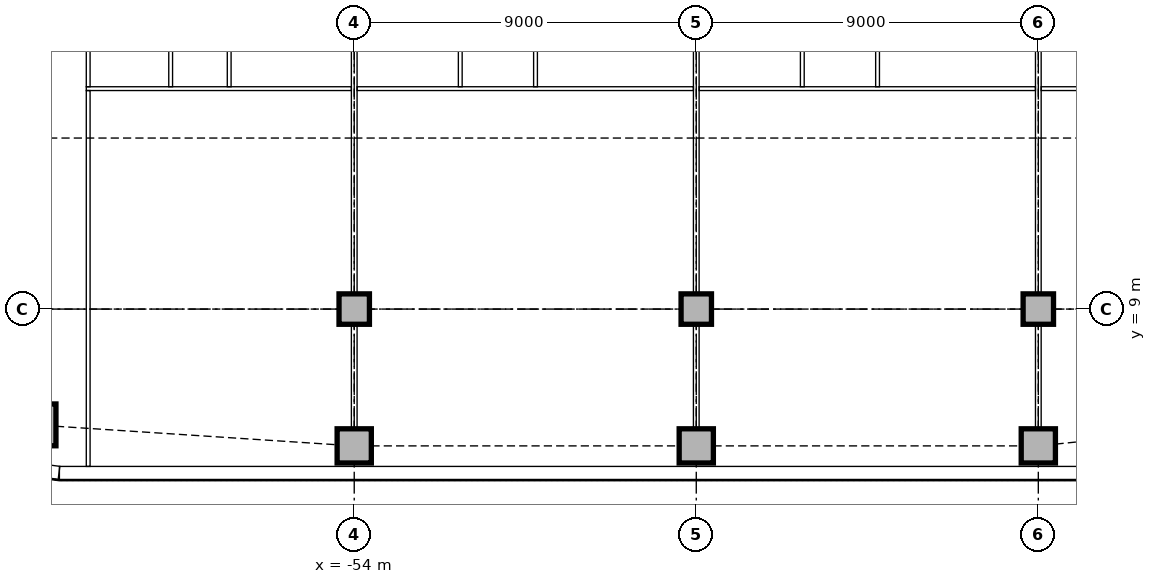
"""IFC4 building model, lengths in metres.
Left out: names, types, materials, properties, quantities, classifications, styles, units other than length and angle.
Written with IfcOpenShell. Run it as: python <this file> out.ifc"""

import sys

from ifc_helpers import new_model, si_unit, direction, frame, frame_2d, origin, origin_2d, place, context, subcontext, project, spatial, rectangle, extrude, element, fill, save


model = new_model("IFC4")
c1 = context("Model", 3, precision=1e-05, world=origin(), true_north=direction((0.0, 1.0)))
c2 = subcontext(c1, "Body", "Model", "MODEL_VIEW")
j1 = project(units=[si_unit("LENGTHUNIT", "METRE"), si_unit("PLANEANGLEUNIT", "RADIAN")], contexts=[c1])
p1 = place(None, origin())
s1 = spatial("IfcSite", under=j1, at=p1, CompositionType="ELEMENT")
p2 = place(p1, origin())
s2 = spatial("IfcBuilding", under=s1, at=p2, CompositionType="ELEMENT")
p3 = place(p2, frame((0.0, 0.0, 26.0)))
s3 = spatial("IfcBuildingStorey", under=s2, at=p3, CompositionType="ELEMENT", Elevation=26.0)
p4 = place(p3, frame((-62.398, 5.953, 0.0), z_axis=(0.0, 0.0, 1.0), x_axis=(1.0, 0.0, 0.0)))
e1 = element("IfcColumn", 1, at=p4, inside=s3, PredefinedType="COLUMN", context=c2, shape_type="SweptSolid", body=[
    extrude(rectangle(XDim=1.1, YDim=1.1, at=origin_2d()), origin(), (0.0, 0.0, 1.0), 3.85),
])
for number, where, z_axis, x_axis in (
    (2, (-54.0, 5.4, 0.0), (0.0, 0.0, 1.0), (1.0, 0.0, 0.0)),
    (3, (-45.0, 5.4, 0.0), (0.0, 0.0, 1.0), (1.0, 0.0, 0.0)),
    (4, (-36.0, 5.4, 0.0), (0.0, 0.0, 1.0), (1.0, 0.0, 0.0)),
):
    element("IfcColumn", number, at=place(p3, frame(where, z_axis=z_axis, x_axis=x_axis)), inside=s3, PredefinedType="COLUMN", context=c2, shape_type="SweptSolid", body=[
        extrude(rectangle(XDim=0.9, YDim=0.9, at=origin_2d()), origin(), (0.0, 0.0, 1.0), 3.85),
    ])
for number, where, z_axis, x_axis in (
    (5, (-54.0, 9.0, 0.0), (0.0, 0.0, 1.0), (1.0, 0.0, 0.0)),
    (6, (-45.0, 9.0, 0.0), (0.0, 0.0, 1.0), (1.0, 0.0, 0.0)),
    (7, (-36.0, 9.0, 0.0), (0.0, 0.0, 1.0), (1.0, 0.0, 0.0)),
):
    element("IfcColumn", number, at=place(p3, frame(where, z_axis=z_axis, x_axis=x_axis)), inside=s3, PredefinedType="COLUMN", context=c2, shape_type="SweptSolid", body=[
        extrude(rectangle(XDim=0.8, YDim=0.8, at=origin_2d()), origin(), (0.0, 0.0, 1.0), 3.85),
    ])
p5 = place(p3, frame((-61.757, 4.68, 0.0), z_axis=(0.0, 0.0, 1.0), x_axis=(1.0, 0.0, 0.0)))
e8 = element("IfcWall", 8, at=p5, inside=s3, PredefinedType="STANDARD", context=c2, shape_type="SweptSolid", body=[
    extrude(rectangle(XDim=30.515, YDim=0.36, at=frame_2d((15.257, 0.0))), origin(), (0.0, 0.0, 1.0), 3.85),
])
p6 = place(p5, frame((2.357, 0.0, 0.9)))
e9 = element("IfcOpeningElement", 9, at=p6, cuts=e8, PredefinedType="OPENING", context=c2, shape_type="SweptSolid", body=[
    extrude(rectangle(XDim=3.3, YDim=1.6, at=frame_2d((1.65, 0.8))), frame((0.0, 0.19, 0.0), z_axis=(0.0, -1.0, 0.0), x_axis=(1.0, 0.0, 0.0)), (0.0, 0.0, 1.0), 0.38),
])
p7 = place(p5, frame((6.857, 0.0, 0.9)))
e10 = element("IfcOpeningElement", 10, at=p7, cuts=e8, PredefinedType="OPENING", context=c2, shape_type="SweptSolid", body=[
    extrude(rectangle(XDim=3.3, YDim=1.6, at=frame_2d((1.65, 0.8))), frame((0.0, 0.19, 0.0), z_axis=(0.0, -1.0, 0.0), x_axis=(1.0, 0.0, 0.0)), (0.0, 0.0, 1.0), 0.38),
])
p8 = place(p5, frame((11.357, 0.0, 0.9)))
e11 = element("IfcOpeningElement", 11, at=p8, cuts=e8, PredefinedType="OPENING", context=c2, shape_type="SweptSolid", body=[
    extrude(rectangle(XDim=3.3, YDim=1.6, at=frame_2d((1.65, 0.8))), frame((0.0, 0.19, 0.0), z_axis=(0.0, -1.0, 0.0), x_axis=(1.0, 0.0, 0.0)), (0.0, 0.0, 1.0), 0.38),
])
p9 = place(p5, frame((15.857, 0.0, 0.9)))
e12 = element("IfcOpeningElement", 12, at=p9, cuts=e8, PredefinedType="OPENING", context=c2, shape_type="SweptSolid", body=[
    extrude(rectangle(XDim=3.3, YDim=1.6, at=frame_2d((1.65, 0.8))), frame((0.0, 0.19, 0.0), z_axis=(0.0, -1.0, 0.0), x_axis=(1.0, 0.0, 0.0)), (0.0, 0.0, 1.0), 0.38),
])
p10 = place(p5, frame((20.357, 0.0, 0.9)))
e13 = element("IfcOpeningElement", 13, at=p10, cuts=e8, PredefinedType="OPENING", context=c2, shape_type="SweptSolid", body=[
    extrude(rectangle(XDim=3.3, YDim=1.6, at=frame_2d((1.65, 0.8))), frame((0.0, 0.19, 0.0), z_axis=(0.0, -1.0, 0.0), x_axis=(1.0, 0.0, 0.0)), (0.0, 0.0, 1.0), 0.38),
])
p11 = place(p5, frame((24.857, 0.0, 0.9)))
e14 = element("IfcOpeningElement", 14, at=p11, cuts=e8, PredefinedType="OPENING", context=c2, shape_type="SweptSolid", body=[
    extrude(rectangle(XDim=3.3, YDim=1.6, at=frame_2d((1.65, 0.8))), frame((0.0, 0.19, 0.0), z_axis=(0.0, -1.0, 0.0), x_axis=(1.0, 0.0, 0.0)), (0.0, 0.0, 1.0), 0.38),
])
p12 = place(p3, frame((-62.476, 4.776, 0.0), z_axis=(0.0, 0.0, 1.0), x_axis=(0.99144092581, -0.13055608231, 0.0)))
e15 = element("IfcWall", 15, at=p12, inside=s3, PredefinedType="STANDARD", context=c2, shape_type="SweptSolid", body=[
    extrude(rectangle(XDim=0.713, YDim=0.36, at=frame_2d((0.356, 0.0))), origin(), (0.0, 0.0, 1.0), 3.85),
])
p13 = place(p3, frame((-54.0, 9.4, 0.0), z_axis=(0.0, 0.0, 1.0), x_axis=(0.0, 1.0, 0.0)))
e16 = element("IfcWall", 16, at=p13, inside=s3, PredefinedType="PARTITIONING", context=c2, shape_type="SweptSolid", body=[
    extrude(rectangle(XDim=8.2, YDim=0.15, at=frame_2d((4.1, 0.0))), origin(), (0.0, 0.0, 1.0), 3.158),
])
p14 = place(p3, frame((-54.0, 5.85, 0.0), z_axis=(0.0, 0.0, 1.0), x_axis=(0.0, 1.0, 0.0)))
e17 = element("IfcWall", 17, at=p14, inside=s3, PredefinedType="PARTITIONING", context=c2, shape_type="SweptSolid", body=[
    extrude(rectangle(XDim=2.75, YDim=0.15, at=frame_2d((1.375, 0.0))), origin(), (0.0, 0.0, 1.0), 3.652),
])
p15 = place(p3, frame((-45.0, 9.4, 0.0), z_axis=(0.0, 0.0, 1.0), x_axis=(0.0, 1.0, 0.0)))
e18 = element("IfcWall", 18, at=p15, inside=s3, PredefinedType="PARTITIONING", context=c2, shape_type="SweptSolid", body=[
    extrude(rectangle(XDim=8.2, YDim=0.15, at=frame_2d((4.1, 0.0))), origin(), (0.0, 0.0, 1.0), 3.158),
])
p16 = place(p3, frame((-45.0, 5.85, 0.0), z_axis=(0.0, 0.0, 1.0), x_axis=(0.0, 1.0, 0.0)))
e19 = element("IfcWall", 19, at=p16, inside=s3, PredefinedType="PARTITIONING", context=c2, shape_type="SweptSolid", body=[
    extrude(rectangle(XDim=2.75, YDim=0.15, at=frame_2d((1.375, 0.0))), origin(), (0.0, 0.0, 1.0), 3.652),
])
p17 = place(p3, frame((-36.0, 9.4, 0.0), z_axis=(0.0, 0.0, 1.0), x_axis=(0.0, 1.0, 0.0)))
e20 = element("IfcWall", 20, at=p17, inside=s3, PredefinedType="PARTITIONING", context=c2, shape_type="SweptSolid", body=[
    extrude(rectangle(XDim=8.2, YDim=0.15, at=frame_2d((4.1, 0.0))), origin(), (0.0, 0.0, 1.0), 3.158),
])
p18 = place(p3, frame((-36.0, 5.85, 0.0), z_axis=(0.0, 0.0, 1.0), x_axis=(0.0, 1.0, 0.0)))
e21 = element("IfcWall", 21, at=p18, inside=s3, PredefinedType="PARTITIONING", context=c2, shape_type="SweptSolid", body=[
    extrude(rectangle(XDim=2.75, YDim=0.15, at=frame_2d((1.375, 0.0))), origin(), (0.0, 0.0, 1.0), 3.652),
])
p19 = place(p3, frame((-61.05, 14.8, 0.0), z_axis=(0.0, 0.0, 1.0), x_axis=(1.0, 0.0, 0.0)))
e22 = element("IfcWall", 22, at=p19, inside=s3, PredefinedType="PARTITIONING", context=c2, shape_type="SweptSolid", body=[
    extrude(rectangle(XDim=6.975, YDim=0.1, at=frame_2d((3.487, 0.0))), origin(), (0.0, 0.0, 1.0), 3.85),
])
p20 = place(p19, frame((2.52, 0.0, 0.0)))
e23 = element("IfcOpeningElement", 23, at=p20, cuts=e22, PredefinedType="OPENING", context=c2, shape_type="SweptSolid", body=[
    extrude(rectangle(XDim=0.9, YDim=2.1, at=frame_2d((0.45, 1.05))), frame((0.0, 0.06, 0.0), z_axis=(0.0, -1.0, 0.0), x_axis=(1.0, 0.0, 0.0)), (0.0, 0.0, 1.0), 0.12),
])
p21 = place(p3, frame((-53.925, 14.8, 0.0), z_axis=(0.0, 0.0, 1.0), x_axis=(1.0, 0.0, 0.0)))
e24 = element("IfcWall", 24, at=p21, inside=s3, PredefinedType="PARTITIONING", context=c2, shape_type="SweptSolid", body=[
    extrude(rectangle(XDim=8.85, YDim=0.1, at=frame_2d((4.425, 0.0))), origin(), (0.0, 0.0, 1.0), 3.85),
])
p22 = place(p21, frame((3.265, 0.0, 0.0)))
e25 = element("IfcOpeningElement", 25, at=p22, cuts=e24, PredefinedType="OPENING", context=c2, shape_type="SweptSolid", body=[
    extrude(rectangle(XDim=0.9, YDim=2.1, at=frame_2d((0.45, 1.05))), frame((0.0, 0.06, 0.0), z_axis=(0.0, -1.0, 0.0), x_axis=(1.0, 0.0, 0.0)), (0.0, 0.0, 1.0), 0.12),
])
p23 = place(p3, frame((-44.925, 14.8, 0.0), z_axis=(0.0, 0.0, 1.0), x_axis=(1.0, 0.0, 0.0)))
e26 = element("IfcWall", 26, at=p23, inside=s3, PredefinedType="PARTITIONING", context=c2, shape_type="SweptSolid", body=[
    extrude(rectangle(XDim=8.85, YDim=0.1, at=frame_2d((4.425, 0.0))), origin(), (0.0, 0.0, 1.0), 3.85),
])
p24 = place(p23, frame((3.265, 0.0, 0.0)))
e27 = element("IfcOpeningElement", 27, at=p24, cuts=e26, PredefinedType="OPENING", context=c2, shape_type="SweptSolid", body=[
    extrude(rectangle(XDim=0.9, YDim=2.1, at=frame_2d((0.45, 1.05))), frame((0.0, 0.06, 0.0), z_axis=(0.0, -1.0, 0.0), x_axis=(1.0, 0.0, 0.0)), (0.0, 0.0, 1.0), 0.12),
])
p25 = place(p3, frame((-35.925, 14.8, 0.0), z_axis=(0.0, 0.0, 1.0), x_axis=(1.0, 0.0, 0.0)))
e28 = element("IfcWall", 28, at=p25, inside=s3, PredefinedType="PARTITIONING", context=c2, shape_type="SweptSolid", body=[
    extrude(rectangle(XDim=8.565, YDim=0.1, at=frame_2d((4.282, 0.0))), origin(), (0.0, 0.0, 1.0), 3.85),
])
p26 = place(p25, frame((3.103, 0.0, 0.0)))
e29 = element("IfcOpeningElement", 29, at=p26, cuts=e28, PredefinedType="OPENING", context=c2, shape_type="SweptSolid", body=[
    extrude(rectangle(XDim=0.9, YDim=2.1, at=frame_2d((0.45, 1.05))), frame((0.0, 0.06, 0.0), z_axis=(0.0, -1.0, 0.0), x_axis=(1.0, 0.0, 0.0)), (0.0, 0.0, 1.0), 0.12),
])
p27 = place(p3, frame((-61.0, 14.85, 0.0), z_axis=(0.0, 0.0, 1.0), x_axis=(0.0, 1.0, 0.0)))
e30 = element("IfcWall", 30, at=p27, inside=s3, PredefinedType="PARTITIONING", context=c2, shape_type="SweptSolid", body=[
    extrude(rectangle(XDim=3.075, YDim=0.1, at=frame_2d((1.538, 0.0))), origin(), (0.0, 0.0, 1.0), 3.85),
])
p28 = place(p3, frame((-61.0, 4.86, 0.0), z_axis=(0.0, 0.0, 1.0), x_axis=(0.0, 1.0, 0.0)))
e31 = element("IfcWall", 31, at=p28, inside=s3, PredefinedType="PARTITIONING", context=c2, shape_type="SweptSolid", body=[
    extrude(rectangle(XDim=9.89, YDim=0.1, at=frame_2d((4.945, 0.0))), origin(), (0.0, 0.0, 1.0), 3.85),
])
p29 = place(p3, frame((-58.83, 14.85, 0.0), z_axis=(0.0, 0.0, 1.0), x_axis=(0.0, 1.0, 0.0)))
e32 = element("IfcWall", 32, at=p29, inside=s3, PredefinedType="PARTITIONING", context=c2, shape_type="SweptSolid", body=[
    extrude(rectangle(XDim=3.075, YDim=0.1, at=frame_2d((1.538, 0.0))), origin(), (0.0, 0.0, 1.0), 3.85),
])
p30 = place(p29, frame((1.1, 0.0, 0.0)))
e33 = element("IfcOpeningElement", 33, at=p30, cuts=e32, PredefinedType="OPENING", context=c2, shape_type="SweptSolid", body=[
    extrude(rectangle(XDim=0.9, YDim=2.1, at=frame_2d((0.45, 1.05))), frame((0.0, 0.06, 0.0), z_axis=(0.0, -1.0, 0.0), x_axis=(1.0, 0.0, 0.0)), (0.0, 0.0, 1.0), 0.12),
])
p31 = place(p3, frame((-57.29, 14.85, 0.0), z_axis=(0.0, 0.0, 1.0), x_axis=(0.0, 1.0, 0.0)))
e34 = element("IfcWall", 34, at=p31, inside=s3, PredefinedType="PARTITIONING", context=c2, shape_type="SweptSolid", body=[
    extrude(rectangle(XDim=3.075, YDim=0.1, at=frame_2d((1.538, 0.0))), origin(), (0.0, 0.0, 1.0), 3.85),
])
p32 = place(p31, frame((1.1, 0.0, 0.0)))
e35 = element("IfcOpeningElement", 35, at=p32, cuts=e34, PredefinedType="OPENING", context=c2, shape_type="SweptSolid", body=[
    extrude(rectangle(XDim=0.9, YDim=2.1, at=frame_2d((0.45, 1.05))), frame((0.0, 0.06, 0.0), z_axis=(0.0, -1.0, 0.0), x_axis=(1.0, 0.0, 0.0)), (0.0, 0.0, 1.0), 0.12),
])
p33 = place(p3, frame((-51.21, 14.85, 0.0), z_axis=(0.0, 0.0, 1.0), x_axis=(0.0, 1.0, 0.0)))
e36 = element("IfcWall", 36, at=p33, inside=s3, PredefinedType="PARTITIONING", context=c2, shape_type="SweptSolid", body=[
    extrude(rectangle(XDim=3.075, YDim=0.1, at=frame_2d((1.538, 0.0))), origin(), (0.0, 0.0, 1.0), 3.85),
])
p34 = place(p33, frame((1.1, 0.0, 0.0)))
e37 = element("IfcOpeningElement", 37, at=p34, cuts=e36, PredefinedType="OPENING", context=c2, shape_type="SweptSolid", body=[
    extrude(rectangle(XDim=0.9, YDim=2.1, at=frame_2d((0.45, 1.05))), frame((0.0, 0.06, 0.0), z_axis=(0.0, -1.0, 0.0), x_axis=(1.0, 0.0, 0.0)), (0.0, 0.0, 1.0), 0.12),
])
p35 = place(p3, frame((-49.23, 14.85, 0.0), z_axis=(0.0, 0.0, 1.0), x_axis=(0.0, 1.0, 0.0)))
e38 = element("IfcWall", 38, at=p35, inside=s3, PredefinedType="PARTITIONING", context=c2, shape_type="SweptSolid", body=[
    extrude(rectangle(XDim=3.075, YDim=0.1, at=frame_2d((1.538, 0.0))), origin(), (0.0, 0.0, 1.0), 3.85),
])
p36 = place(p35, frame((1.1, 0.0, 0.0)))
e39 = element("IfcOpeningElement", 39, at=p36, cuts=e38, PredefinedType="OPENING", context=c2, shape_type="SweptSolid", body=[
    extrude(rectangle(XDim=0.9, YDim=2.1, at=frame_2d((0.45, 1.05))), frame((0.0, 0.06, 0.0), z_axis=(0.0, -1.0, 0.0), x_axis=(1.0, 0.0, 0.0)), (0.0, 0.0, 1.0), 0.12),
])
p37 = place(p3, frame((-42.21, 14.85, 0.0), z_axis=(0.0, 0.0, 1.0), x_axis=(0.0, 1.0, 0.0)))
e40 = element("IfcWall", 40, at=p37, inside=s3, PredefinedType="PARTITIONING", context=c2, shape_type="SweptSolid", body=[
    extrude(rectangle(XDim=3.075, YDim=0.1, at=frame_2d((1.538, 0.0))), origin(), (0.0, 0.0, 1.0), 3.85),
])
p38 = place(p37, frame((1.1, 0.0, 0.0)))
e41 = element("IfcOpeningElement", 41, at=p38, cuts=e40, PredefinedType="OPENING", context=c2, shape_type="SweptSolid", body=[
    extrude(rectangle(XDim=0.9, YDim=2.1, at=frame_2d((0.45, 1.05))), frame((0.0, 0.06, 0.0), z_axis=(0.0, -1.0, 0.0), x_axis=(1.0, 0.0, 0.0)), (0.0, 0.0, 1.0), 0.12),
])
p39 = place(p3, frame((-40.23, 14.85, 0.0), z_axis=(0.0, 0.0, 1.0), x_axis=(0.0, 1.0, 0.0)))
e42 = element("IfcWall", 42, at=p39, inside=s3, PredefinedType="PARTITIONING", context=c2, shape_type="SweptSolid", body=[
    extrude(rectangle(XDim=3.075, YDim=0.1, at=frame_2d((1.538, 0.0))), origin(), (0.0, 0.0, 1.0), 3.85),
])
p40 = place(p39, frame((1.1, 0.0, 0.0)))
e43 = element("IfcOpeningElement", 43, at=p40, cuts=e42, PredefinedType="OPENING", context=c2, shape_type="SweptSolid", body=[
    extrude(rectangle(XDim=0.9, YDim=2.1, at=frame_2d((0.45, 1.05))), frame((0.0, 0.06, 0.0), z_axis=(0.0, -1.0, 0.0), x_axis=(1.0, 0.0, 0.0)), (0.0, 0.0, 1.0), 0.12),
])
p41 = place(p6, origin())
e44 = element("IfcWindow", 44, at=p41, inside=s3, PartitioningType="SINGLE_PANEL", PredefinedType="WINDOW", context=c2, shape_type="SweptSolid", body=[
    extrude(rectangle(XDim=3.3, YDim=1.6, at=frame_2d((1.65, 0.8))), frame((0.0, 0.13, 0.0), z_axis=(0.0, -1.0, 0.0), x_axis=(1.0, 0.0, 0.0)), (0.0, 0.0, 1.0), 0.06),
])
fill(e9, e44)
p42 = place(p7, origin())
e45 = element("IfcWindow", 45, at=p42, inside=s3, PartitioningType="SINGLE_PANEL", PredefinedType="WINDOW", context=c2, shape_type="SweptSolid", body=[
    extrude(rectangle(XDim=3.3, YDim=1.6, at=frame_2d((1.65, 0.8))), frame((0.0, 0.13, 0.0), z_axis=(0.0, -1.0, 0.0), x_axis=(1.0, 0.0, 0.0)), (0.0, 0.0, 1.0), 0.06),
])
fill(e10, e45)
p43 = place(p8, origin())
e46 = element("IfcWindow", 46, at=p43, inside=s3, PartitioningType="SINGLE_PANEL", PredefinedType="WINDOW", context=c2, shape_type="SweptSolid", body=[
    extrude(rectangle(XDim=3.3, YDim=1.6, at=frame_2d((1.65, 0.8))), frame((0.0, 0.13, 0.0), z_axis=(0.0, -1.0, 0.0), x_axis=(1.0, 0.0, 0.0)), (0.0, 0.0, 1.0), 0.06),
])
fill(e11, e46)
p44 = place(p9, origin())
e47 = element("IfcWindow", 47, at=p44, inside=s3, PartitioningType="SINGLE_PANEL", PredefinedType="WINDOW", context=c2, shape_type="SweptSolid", body=[
    extrude(rectangle(XDim=3.3, YDim=1.6, at=frame_2d((1.65, 0.8))), frame((0.0, 0.13, 0.0), z_axis=(0.0, -1.0, 0.0), x_axis=(1.0, 0.0, 0.0)), (0.0, 0.0, 1.0), 0.06),
])
fill(e12, e47)
p45 = place(p10, origin())
e48 = element("IfcWindow", 48, at=p45, inside=s3, PartitioningType="SINGLE_PANEL", PredefinedType="WINDOW", context=c2, shape_type="SweptSolid", body=[
    extrude(rectangle(XDim=3.3, YDim=1.6, at=frame_2d((1.65, 0.8))), frame((0.0, 0.13, 0.0), z_axis=(0.0, -1.0, 0.0), x_axis=(1.0, 0.0, 0.0)), (0.0, 0.0, 1.0), 0.06),
])
fill(e13, e48)
p46 = place(p11, origin())
e49 = element("IfcWindow", 49, at=p46, inside=s3, PartitioningType="SINGLE_PANEL", PredefinedType="WINDOW", context=c2, shape_type="SweptSolid", body=[
    extrude(rectangle(XDim=3.3, YDim=1.6, at=frame_2d((1.65, 0.8))), frame((0.0, 0.13, 0.0), z_axis=(0.0, -1.0, 0.0), x_axis=(1.0, 0.0, 0.0)), (0.0, 0.0, 1.0), 0.06),
])
fill(e14, e49)
p47 = place(p20, origin())
e50 = element("IfcDoor", 50, at=p47, inside=s3, OperationType="SINGLE_SWING_LEFT", PredefinedType="DOOR", context=c2, shape_type="SweptSolid", body=[
    extrude(rectangle(XDim=0.9, YDim=2.1, at=frame_2d((0.45, 1.05))), frame((0.0, 0.025, 0.0), z_axis=(0.0, -1.0, 0.0), x_axis=(1.0, 0.0, 0.0)), (0.0, 0.0, 1.0), 0.05),
])
fill(e23, e50)
p48 = place(p22, origin())
e51 = element("IfcDoor", 51, at=p48, inside=s3, OperationType="SINGLE_SWING_RIGHT", PredefinedType="DOOR", context=c2, shape_type="SweptSolid", body=[
    extrude(rectangle(XDim=0.9, YDim=2.1, at=frame_2d((0.45, 1.05))), frame((0.0, 0.025, 0.0), z_axis=(0.0, -1.0, 0.0), x_axis=(1.0, 0.0, 0.0)), (0.0, 0.0, 1.0), 0.05),
])
fill(e25, e51)
p49 = place(p24, origin())
e52 = element("IfcDoor", 52, at=p49, inside=s3, OperationType="SINGLE_SWING_RIGHT", PredefinedType="DOOR", context=c2, shape_type="SweptSolid", body=[
    extrude(rectangle(XDim=0.9, YDim=2.1, at=frame_2d((0.45, 1.05))), frame((0.0, 0.025, 0.0), z_axis=(0.0, -1.0, 0.0), x_axis=(1.0, 0.0, 0.0)), (0.0, 0.0, 1.0), 0.05),
])
fill(e27, e52)
save(model, sys.argv[1])
